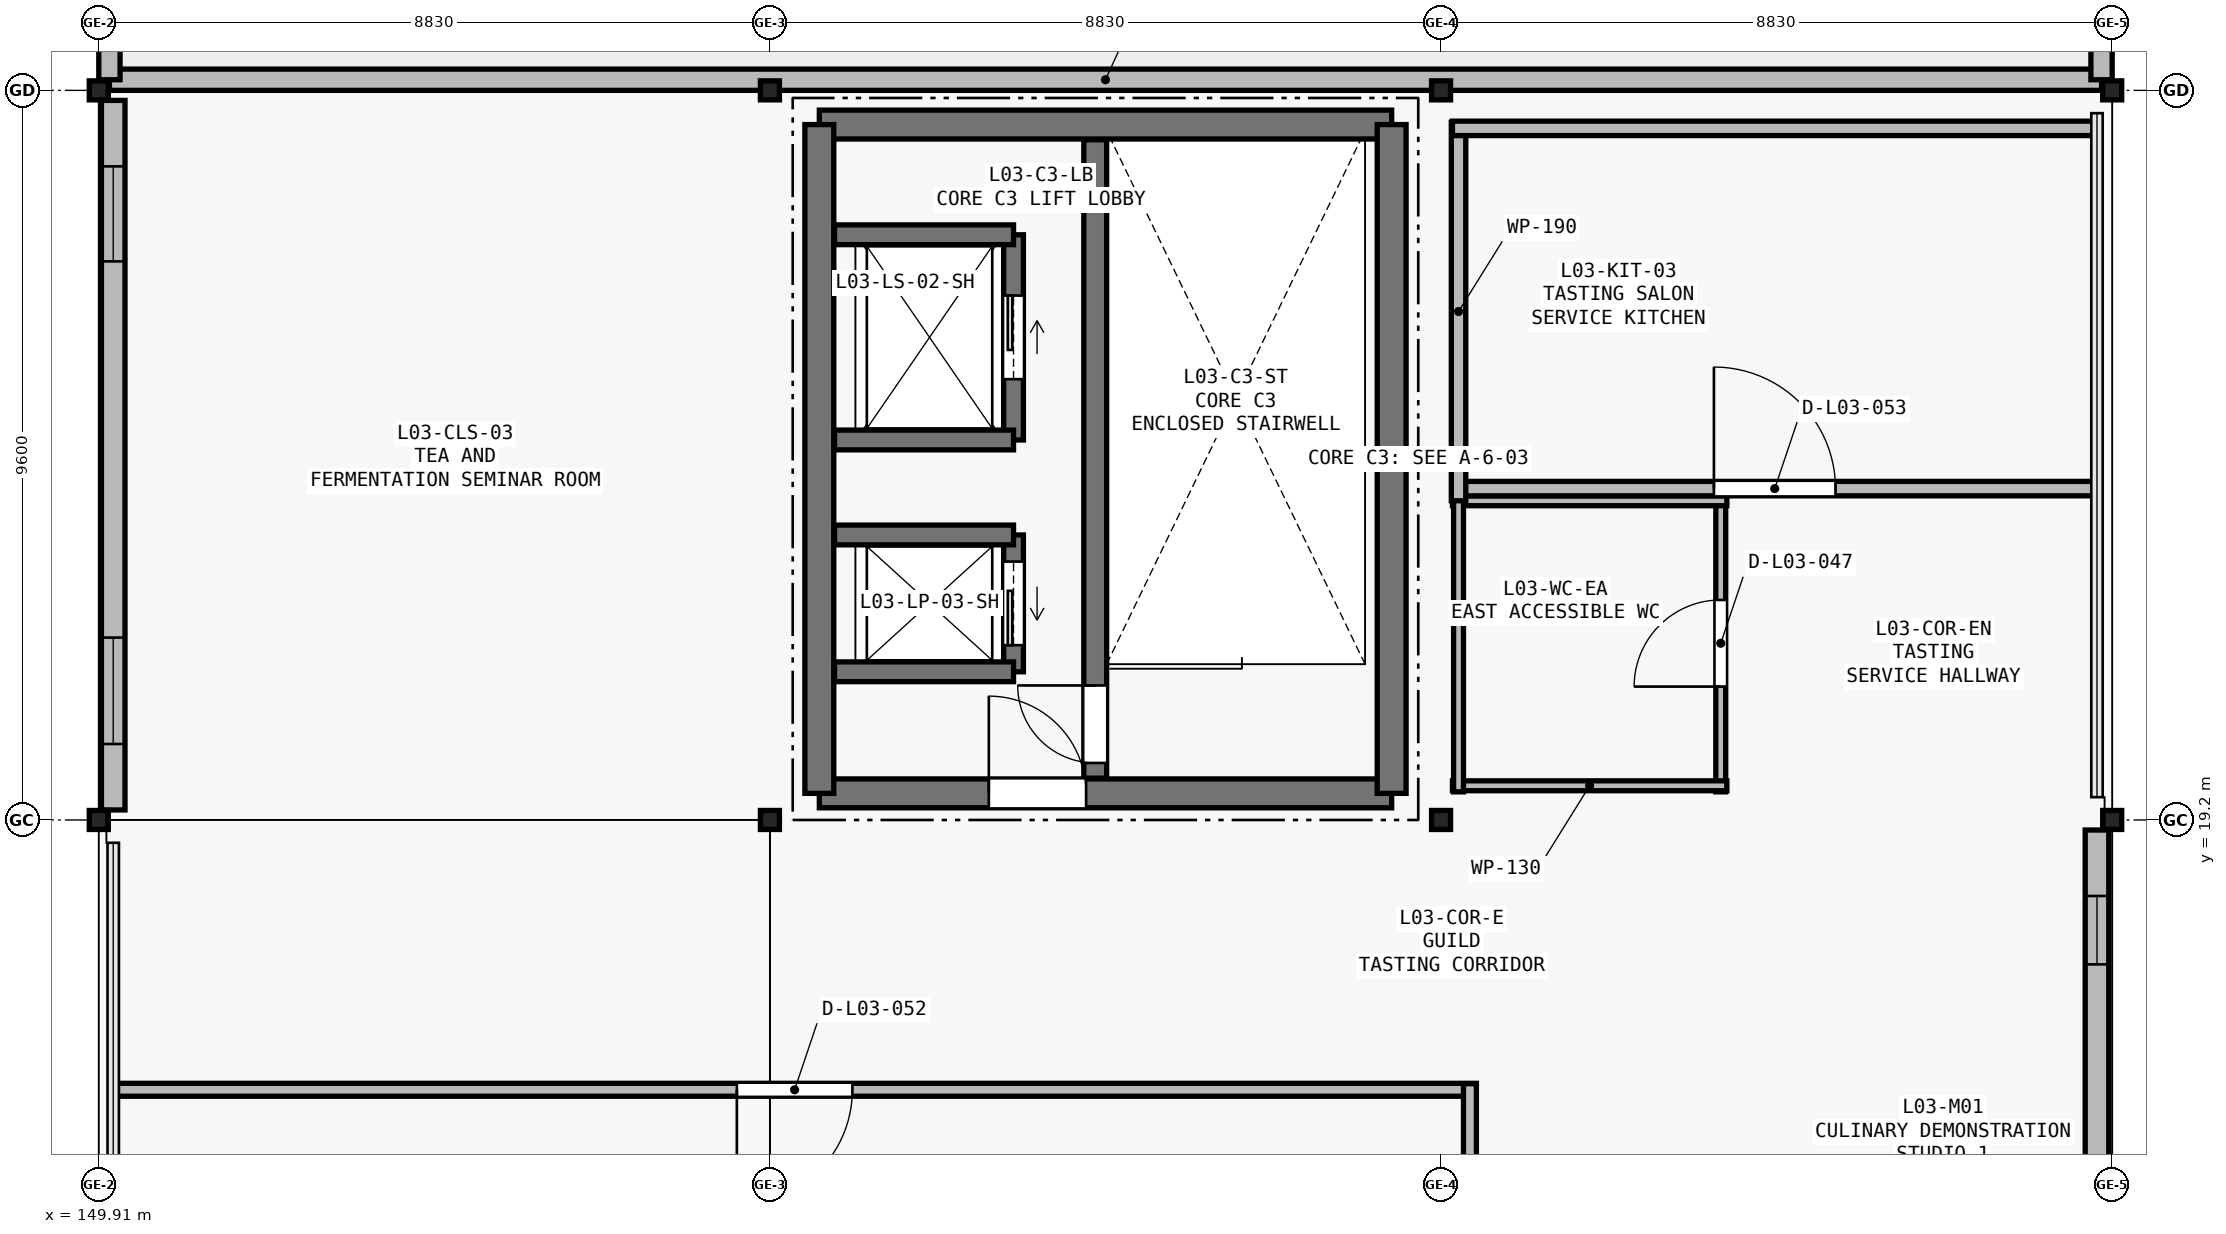
"""IFC4 building model, lengths in metres.
Left out: names, types, materials, properties, quantities, classifications, styles, units other than length and angle.
Written with IfcOpenShell. Run it as: python <this file> out.ifc"""

import sys

from ifc_helpers import new_model, si_unit, direction, frame, frame_2d, origin, origin_2d, place, context, subcontext, project, spatial, rectangle, i_section, extrude, element, fill, save


model = new_model("IFC4")
c1 = context("Model", 3, precision=1e-05, world=origin(), true_north=direction((0.0, 1.0)))
c2 = subcontext(c1, "Body", "Model", "MODEL_VIEW")
j1 = project(units=[si_unit("LENGTHUNIT", "METRE"), si_unit("PLANEANGLEUNIT", "RADIAN")], contexts=[c1])
p1 = place(None, origin())
s1 = spatial("IfcSite", under=j1, at=p1, CompositionType="ELEMENT")
p2 = place(p1, origin())
s2 = spatial("IfcBuilding", under=s1, at=p2, CompositionType="ELEMENT")
p3 = place(p2, frame((0.0, 0.0, 15.0)))
s3 = spatial("IfcBuildingStorey", under=s2, at=p3, CompositionType="ELEMENT", Elevation=15.0)
for number, where, z_axis, x_axis in (
    (1, (149.91, 19.2, 0.0), (0.0, 0.0, 1.0), (1.0, 0.0, 0.0)),
    (2, (149.91, 28.8, 0.0), (0.0, 0.0, 1.0), (1.0, 0.0, 0.0)),
    (3, (158.74, 19.2, 0.0), (0.0, 0.0, 1.0), (1.0, 0.0, 0.0)),
    (4, (158.74, 28.8, 0.0), (0.0, 0.0, 1.0), (1.0, 0.0, 0.0)),
    (5, (167.57, 19.2, 0.0), (0.0, 0.0, 1.0), (1.0, 0.0, 0.0)),
    (6, (167.57, 28.8, 0.0), (0.0, 0.0, 1.0), (1.0, 0.0, 0.0)),
    (7, (176.4, 19.2, 0.0), (0.0, 0.0, 1.0), (1.0, 0.0, 0.0)),
    (8, (176.4, 28.8, 0.0), (0.0, 0.0, 1.0), (1.0, 0.0, 0.0)),
):
    element("IfcColumn", number, at=place(p3, frame(where, z_axis=z_axis, x_axis=x_axis)), inside=s3, PredefinedType="COLUMN", context=c2, shape_type="SweptSolid", body=[
        extrude(i_section(OverallWidth=0.25, OverallDepth=0.25, WebThickness=0.009, FlangeThickness=0.014, FilletRadius=0.016, at=origin_2d()), origin(), (0.0, 0.0, 1.0), 4.2),
    ])
p4 = place(p3, frame((176.2, 19.068, 0.0), z_axis=(0.0, 0.0, 1.0), x_axis=(0.0, -1.0, 0.0)))
e9 = element("IfcWall", 9, at=p4, inside=s3, PredefinedType="SOLIDWALL", context=c2, shape_type="SweptSolid", body=[
    extrude(rectangle(XDim=9.336, YDim=0.31, at=frame_2d((4.668, 0.0))), origin(), (0.0, 0.0, 1.0), 3.35),
])
p5 = place(p4, frame((0.868, 0.0, 0.95)))
e10 = element("IfcOpeningElement", 10, at=p5, cuts=e9, PredefinedType="OPENING", context=c2, shape_type="SweptSolid", body=[
    extrude(rectangle(XDim=0.9, YDim=2.1, at=frame_2d((0.45, 1.05))), frame((0.0, 0.165, 0.0), z_axis=(0.0, -1.0, 0.0), x_axis=(1.0, 0.0, 0.0)), (0.0, 0.0, 1.0), 0.33),
])
p6 = place(p4, frame((7.368, 0.0, 0.95)))
e11 = element("IfcOpeningElement", 11, at=p6, cuts=e9, PredefinedType="OPENING", context=c2, shape_type="SweptSolid", body=[
    extrude(rectangle(XDim=1.1, YDim=2.1, at=frame_2d((0.55, 1.05))), frame((0.0, 0.165, 0.0), z_axis=(0.0, -1.0, 0.0), x_axis=(1.0, 0.0, 0.0)), (0.0, 0.0, 1.0), 0.33),
])
p7 = place(p3, frame((150.1, 28.668, 0.0), z_axis=(0.0, 0.0, 1.0), x_axis=(0.0, -1.0, 0.0)))
e12 = element("IfcWall", 12, at=p7, inside=s3, PredefinedType="SOLIDWALL", context=c2, shape_type="SweptSolid", body=[
    extrude(rectangle(XDim=9.336, YDim=0.31, at=frame_2d((4.668, 0.0))), origin(), (0.0, 0.0, 1.0), 3.35),
])
p8 = place(p7, frame((0.868, 0.0, 0.95)))
e13 = element("IfcOpeningElement", 13, at=p8, cuts=e12, PredefinedType="OPENING", context=c2, shape_type="SweptSolid", body=[
    extrude(rectangle(XDim=1.25, YDim=2.1, at=frame_2d((0.625, 1.05))), frame((0.0, 0.165, 0.0), z_axis=(0.0, -1.0, 0.0), x_axis=(1.0, 0.0, 0.0)), (0.0, 0.0, 1.0), 0.33),
])
p9 = place(p7, frame((7.068, 0.0, 0.95)))
e14 = element("IfcOpeningElement", 14, at=p9, cuts=e12, PredefinedType="OPENING", context=c2, shape_type="SweptSolid", body=[
    extrude(rectangle(XDim=1.4, YDim=2.1, at=frame_2d((0.7, 1.05))), frame((0.0, 0.165, 0.0), z_axis=(0.0, -1.0, 0.0), x_axis=(1.0, 0.0, 0.0)), (0.0, 0.0, 1.0), 0.33),
])
p10 = place(p3, frame((150.05, 28.94, 0.01), z_axis=(0.0, 0.0, 1.0), x_axis=(1.0, 0.0, 0.0)))
e15 = element("IfcWall", 15, at=p10, inside=s3, PredefinedType="PARAPET", context=c2, shape_type="SweptSolid", body=[
    extrude(rectangle(XDim=26.21, YDim=0.28, at=frame_2d((13.105, 0.0))), origin(), (0.0, 0.0, 1.0), 1.15),
])
for number, where, z_axis, x_axis in (
    (16, (176.26, 28.94, 0.01), (0.0, 0.0, 1.0), (0.0, 1.0, 0.0)),
    (17, (150.05, 35.86, 0.01), (0.0, 0.0, 1.0), (0.0, -1.0, 0.0)),
):
    element("IfcWall", number, at=place(p3, frame(where, z_axis=z_axis, x_axis=x_axis)), inside=s3, PredefinedType="PARAPET", context=c2, shape_type="SweptSolid", body=[
        extrude(rectangle(XDim=6.92, YDim=0.28, at=frame_2d((3.46, 0.0))), origin(), (0.0, 0.0, 1.0), 1.15),
    ])
p11 = place(p3, frame((159.39, 19.55, 0.0), z_axis=(0.0, 0.0, 1.0), x_axis=(1.0, 0.0, 0.0)))
e18 = element("IfcWall", 18, at=p11, inside=s3, PredefinedType="SHEAR", context=c2, shape_type="SweptSolid", body=[
    extrude(rectangle(XDim=7.53, YDim=0.38, at=frame_2d((3.765, 0.0))), origin(), (0.0, 0.0, 1.0), 4.2),
])
p12 = place(p11, frame((2.23, 0.0, 0.0)))
e19 = element("IfcOpeningElement", 19, at=p12, cuts=e18, PredefinedType="OPENING", context=c2, shape_type="SweptSolid", body=[
    extrude(rectangle(XDim=1.28, YDim=2.15, at=frame_2d((0.64, 1.075))), frame((0.0, 0.2, 0.0), z_axis=(0.0, -1.0, 0.0), x_axis=(1.0, 0.0, 0.0)), (0.0, 0.0, 1.0), 0.4),
])
p13 = place(p3, frame((166.92, 28.35, 0.0), z_axis=(0.0, 0.0, 1.0), x_axis=(-1.0, 0.0, 0.0)))
e20 = element("IfcWall", 20, at=p13, inside=s3, PredefinedType="SHEAR", context=c2, shape_type="SweptSolid", body=[
    extrude(rectangle(XDim=7.53, YDim=0.38, at=frame_2d((3.765, 0.0))), origin(), (0.0, 0.0, 1.0), 4.2),
])
for number, where, z_axis, x_axis in (
    (21, (159.39, 28.35, 0.0), (0.0, 0.0, 1.0), (0.0, -1.0, 0.0)),
    (22, (166.92, 19.55, 0.0), (0.0, 0.0, 1.0), (0.0, 1.0, 0.0)),
):
    element("IfcWall", number, at=place(p3, frame(where, z_axis=z_axis, x_axis=x_axis)), inside=s3, PredefinedType="SHEAR", context=c2, shape_type="SweptSolid", body=[
        extrude(rectangle(XDim=8.8, YDim=0.38, at=frame_2d((4.4, 0.0))), origin(), (0.0, 0.0, 1.0), 4.2),
    ])
p14 = place(p3, frame((163.02, 19.75, 0.0), z_axis=(0.0, 0.0, 1.0), x_axis=(0.0, 1.0, 0.0)))
e23 = element("IfcWall", 23, at=p14, inside=s3, PredefinedType="SHEAR", context=c2, shape_type="SweptSolid", body=[
    extrude(rectangle(XDim=8.4, YDim=0.3, at=frame_2d((4.2, 0.0))), origin(), (0.0, 0.0, 1.0), 4.2),
])
p15 = place(p14, frame((0.2, 0.0, 0.0)))
e24 = element("IfcOpeningElement", 24, at=p15, cuts=e23, PredefinedType="OPENING", context=c2, shape_type="SweptSolid", body=[
    extrude(rectangle(XDim=1.02, YDim=2.1, at=frame_2d((0.51, 1.05))), frame((0.0, 0.16, 0.0), z_axis=(0.0, -1.0, 0.0), x_axis=(1.0, 0.0, 0.0)), (0.0, 0.0, 1.0), 0.32),
])
p16 = place(p3, frame((161.945, 21.15, 0.0), z_axis=(0.0, 0.0, 1.0), x_axis=(0.0, 1.0, 0.0)))
e25 = element("IfcWall", 25, at=p16, inside=s3, PredefinedType="SHEAR", context=c2, shape_type="SweptSolid", body=[
    extrude(rectangle(XDim=1.8, YDim=0.26, at=frame_2d((0.9, 0.0))), origin(), (0.0, 0.0, 1.0), 4.2),
])
p17 = place(p16, frame((0.35, 0.0, 0.0)))
e26 = element("IfcOpeningElement", 26, at=p17, cuts=e25, PredefinedType="OPENING", context=c2, shape_type="SweptSolid", body=[
    extrude(rectangle(XDim=1.1, YDim=2.15, at=frame_2d((0.55, 1.075))), frame((0.0, 0.14, 0.0), z_axis=(0.0, -1.0, 0.0), x_axis=(1.0, 0.0, 0.0)), (0.0, 0.0, 1.0), 0.28),
])
for number, where, z_axis, x_axis in (
    (27, (159.59, 21.15, 0.0), (0.0, 0.0, 1.0), (1.0, 0.0, 0.0)),
    (28, (159.59, 22.95, 0.0), (0.0, 0.0, 1.0), (1.0, 0.0, 0.0)),
):
    element("IfcWall", number, at=place(p3, frame(where, z_axis=z_axis, x_axis=x_axis)), inside=s3, PredefinedType="SHEAR", context=c2, shape_type="SweptSolid", body=[
        extrude(rectangle(XDim=2.355, YDim=0.26, at=frame_2d((1.177, 0.0))), origin(), (0.0, 0.0, 1.0), 4.2),
    ])
p18 = place(p3, frame((161.945, 24.2, 0.0), z_axis=(0.0, 0.0, 1.0), x_axis=(0.0, 1.0, 0.0)))
e29 = element("IfcWall", 29, at=p18, inside=s3, PredefinedType="SHEAR", context=c2, shape_type="SweptSolid", body=[
    extrude(rectangle(XDim=2.7, YDim=0.26, at=frame_2d((1.35, 0.0))), origin(), (0.0, 0.0, 1.0), 4.2),
])
p19 = place(p18, frame((0.8, 0.0, 0.0)))
e30 = element("IfcOpeningElement", 30, at=p19, cuts=e29, PredefinedType="OPENING", context=c2, shape_type="SweptSolid", body=[
    extrude(rectangle(XDim=1.1, YDim=2.15, at=frame_2d((0.55, 1.075))), frame((0.0, 0.14, 0.0), z_axis=(0.0, -1.0, 0.0), x_axis=(1.0, 0.0, 0.0)), (0.0, 0.0, 1.0), 0.28),
])
for number, where, z_axis, x_axis in (
    (31, (159.59, 24.2, 0.0), (0.0, 0.0, 1.0), (1.0, 0.0, 0.0)),
    (32, (159.59, 26.9, 0.0), (0.0, 0.0, 1.0), (1.0, 0.0, 0.0)),
):
    element("IfcWall", number, at=place(p3, frame(where, z_axis=z_axis, x_axis=x_axis)), inside=s3, PredefinedType="SHEAR", context=c2, shape_type="SweptSolid", body=[
        extrude(rectangle(XDim=2.355, YDim=0.26, at=frame_2d((1.177, 0.0))), origin(), (0.0, 0.0, 1.0), 4.2),
    ])
p20 = place(p3, frame((171.25, 19.57, 0.0), z_axis=(0.0, 0.0, 1.0), x_axis=(0.0, 1.0, 0.0)))
e33 = element("IfcWall", 33, at=p20, inside=s3, PredefinedType="PARTITIONING", context=c2, shape_type="SweptSolid", body=[
    extrude(rectangle(XDim=3.91, YDim=0.13, at=frame_2d((1.955, 0.0))), origin(), (0.0, 0.0, 1.0), 3.72),
])
p21 = place(p20, frame((1.385, 0.0, 0.0)))
e34 = element("IfcOpeningElement", 34, at=p21, cuts=e33, PredefinedType="OPENING", context=c2, shape_type="SweptSolid", body=[
    extrude(rectangle(XDim=1.14, YDim=2.22, at=frame_2d((0.57, 1.11))), frame((0.0, 0.075, 0.0), z_axis=(0.0, -1.0, 0.0), x_axis=(1.0, 0.0, 0.0)), (0.0, 0.0, 1.0), 0.15),
])
for number, where, z_axis, x_axis in (
    (35, (167.72, 19.65, 0.0), (0.0, 0.0, 1.0), (1.0, 0.0, 0.0)),
    (36, (171.33, 23.4, 0.0), (0.0, 0.0, 1.0), (-1.0, 0.0, 0.0)),
):
    element("IfcWall", number, at=place(p3, frame(where, z_axis=z_axis, x_axis=x_axis)), inside=s3, PredefinedType="PARTITIONING", context=c2, shape_type="SweptSolid", body=[
        extrude(rectangle(XDim=3.61, YDim=0.13, at=frame_2d((1.805, 0.0))), origin(), (0.0, 0.0, 1.0), 3.72),
    ])
p22 = place(p3, frame((167.8, 23.48, 0.0), z_axis=(0.0, 0.0, 1.0), x_axis=(0.0, -1.0, 0.0)))
e37 = element("IfcWall", 37, at=p22, inside=s3, PredefinedType="PARTITIONING", context=c2, shape_type="SweptSolid", body=[
    extrude(rectangle(XDim=3.91, YDim=0.13, at=frame_2d((1.955, 0.0))), origin(), (0.0, 0.0, 1.0), 3.72),
])
p23 = place(p3, frame((168.03, 15.65, 0.0), z_axis=(0.0, 0.0, 1.0), x_axis=(-1.0, 0.0, 0.0)))
e38 = element("IfcWall", 38, at=p23, inside=s3, PredefinedType="PARTITIONING", context=c2, shape_type="SweptSolid", body=[
    extrude(rectangle(XDim=17.93, YDim=0.17, at=frame_2d((8.965, 0.0))), origin(), (0.0, 0.0, 1.0), 3.72),
])
p24 = place(p23, frame((8.205, 0.0, 0.0)))
e39 = element("IfcOpeningElement", 39, at=p24, cuts=e38, PredefinedType="OPENING", context=c2, shape_type="SweptSolid", body=[
    extrude(rectangle(XDim=1.52, YDim=2.28, at=frame_2d((0.76, 1.14))), frame((0.0, 0.095, 0.0), z_axis=(0.0, -1.0, 0.0), x_axis=(1.0, 0.0, 0.0)), (0.0, 0.0, 1.0), 0.19),
])
p25 = place(p3, frame((167.95, 0.2, 0.0), z_axis=(0.0, 0.0, 1.0), x_axis=(0.0, 1.0, 0.0)))
e40 = element("IfcWall", 40, at=p25, inside=s3, PredefinedType="PARTITIONING", context=c2, shape_type="SweptSolid", body=[
    extrude(rectangle(XDim=15.53, YDim=0.17, at=frame_2d((7.765, 0.0))), origin(), (0.0, 0.0, 1.0), 3.72),
])
p26 = place(p3, frame((167.72, 23.56, 0.0), z_axis=(0.0, 0.0, 1.0), x_axis=(1.0, 0.0, 0.0)))
e41 = element("IfcWall", 41, at=p26, inside=s3, PredefinedType="PARTITIONING", context=c2, shape_type="SweptSolid", body=[
    extrude(rectangle(XDim=8.48, YDim=0.19, at=frame_2d((4.24, 0.0))), origin(), (0.0, 0.0, 1.0), 3.72),
])
p27 = place(p26, frame((3.44, 0.0, 0.0)))
e42 = element("IfcOpeningElement", 42, at=p27, cuts=e41, PredefinedType="OPENING", context=c2, shape_type="SweptSolid", body=[
    extrude(rectangle(XDim=1.6, YDim=2.2, at=frame_2d((0.8, 1.1))), frame((0.0, 0.105, 0.0), z_axis=(0.0, -1.0, 0.0), x_axis=(1.0, 0.0, 0.0)), (0.0, 0.0, 1.0), 0.21),
])
p28 = place(p3, frame((167.8, 28.38, 0.0), z_axis=(0.0, 0.0, 1.0), x_axis=(0.0, -1.0, 0.0)))
e43 = element("IfcWall", 43, at=p28, inside=s3, PredefinedType="PARTITIONING", context=c2, shape_type="SweptSolid", body=[
    extrude(rectangle(XDim=4.98, YDim=0.19, at=frame_2d((2.49, 0.0))), origin(), (0.0, 0.0, 1.0), 3.4),
])
p29 = place(p3, frame((176.2, 28.3, 0.0), z_axis=(0.0, 0.0, 1.0), x_axis=(-1.0, 0.0, 0.0)))
e44 = element("IfcWall", 44, at=p29, inside=s3, PredefinedType="PARTITIONING", context=c2, shape_type="SweptSolid", body=[
    extrude(rectangle(XDim=8.48, YDim=0.19, at=frame_2d((4.24, 0.0))), origin(), (0.0, 0.0, 1.0), 3.72),
])
p30 = place(p5, origin())
e45 = element("IfcWindow", 45, at=p30, inside=s3, PartitioningType="SINGLE_PANEL", PredefinedType="WINDOW", context=c2, shape_type="SweptSolid", body=[
    extrude(rectangle(XDim=0.9, YDim=2.1, at=frame_2d((0.45, 1.05))), frame((0.0, 0.03, 0.0), z_axis=(0.0, -1.0, 0.0), x_axis=(1.0, 0.0, 0.0)), (0.0, 0.0, 1.0), 0.06),
])
fill(e10, e45)
p31 = place(p8, origin())
e46 = element("IfcWindow", 46, at=p31, inside=s3, PartitioningType="SINGLE_PANEL", PredefinedType="WINDOW", context=c2, shape_type="SweptSolid", body=[
    extrude(rectangle(XDim=1.25, YDim=2.1, at=frame_2d((0.625, 1.05))), frame((0.0, 0.03, 0.0), z_axis=(0.0, -1.0, 0.0), x_axis=(1.0, 0.0, 0.0)), (0.0, 0.0, 1.0), 0.06),
])
fill(e13, e46)
p32 = place(p9, origin())
e47 = element("IfcWindow", 47, at=p32, inside=s3, PartitioningType="SINGLE_PANEL", PredefinedType="WINDOW", context=c2, shape_type="SweptSolid", body=[
    extrude(rectangle(XDim=1.4, YDim=2.1, at=frame_2d((0.7, 1.05))), frame((0.0, 0.03, 0.0), z_axis=(0.0, -1.0, 0.0), x_axis=(1.0, 0.0, 0.0)), (0.0, 0.0, 1.0), 0.06),
])
fill(e14, e47)
p33 = place(p12, origin())
e48 = element("IfcDoor", 48, at=p33, inside=s3, OperationType="SINGLE_SWING_LEFT", PredefinedType="DOOR", context=c2, shape_type="SweptSolid", body=[
    extrude(rectangle(XDim=1.28, YDim=2.15, at=frame_2d((0.64, 1.075))), frame((0.0, 0.025, 0.0), z_axis=(0.0, -1.0, 0.0), x_axis=(1.0, 0.0, 0.0)), (0.0, 0.0, 1.0), 0.05),
])
fill(e19, e48)
p34 = place(p15, origin())
e49 = element("IfcDoor", 49, at=p34, inside=s3, OperationType="SINGLE_SWING_RIGHT", PredefinedType="DOOR", context=c2, shape_type="SweptSolid", body=[
    extrude(rectangle(XDim=1.02, YDim=2.1, at=frame_2d((0.51, 1.05))), frame((0.0, 0.025, 0.0), z_axis=(0.0, -1.0, 0.0), x_axis=(1.0, 0.0, 0.0)), (0.0, 0.0, 1.0), 0.05),
])
fill(e24, e49)
p35 = place(p17, origin())
e50 = element("IfcDoor", 50, at=p35, inside=s3, OperationType="SLIDING_TO_LEFT", PredefinedType="DOOR", context=c2, shape_type="SweptSolid", body=[
    extrude(rectangle(XDim=1.1, YDim=2.15, at=frame_2d((0.55, 1.075))), frame((0.0, 0.025, 0.0), z_axis=(0.0, -1.0, 0.0), x_axis=(1.0, 0.0, 0.0)), (0.0, 0.0, 1.0), 0.05),
])
fill(e26, e50)
p36 = place(p19, origin())
e51 = element("IfcDoor", 51, at=p36, inside=s3, OperationType="SLIDING_TO_RIGHT", PredefinedType="DOOR", context=c2, shape_type="SweptSolid", body=[
    extrude(rectangle(XDim=1.1, YDim=2.15, at=frame_2d((0.55, 1.075))), frame((0.0, 0.025, 0.0), z_axis=(0.0, -1.0, 0.0), x_axis=(1.0, 0.0, 0.0)), (0.0, 0.0, 1.0), 0.05),
])
fill(e30, e51)
p37 = place(p21, origin())
e52 = element("IfcDoor", 52, at=p37, inside=s3, OperationType="SINGLE_SWING_LEFT", PredefinedType="DOOR", context=c2, shape_type="SweptSolid", body=[
    extrude(rectangle(XDim=1.14, YDim=2.22, at=frame_2d((0.57, 1.11))), frame((0.0, 0.025, 0.0), z_axis=(0.0, -1.0, 0.0), x_axis=(1.0, 0.0, 0.0)), (0.0, 0.0, 1.0), 0.05),
])
fill(e34, e52)
p38 = place(p24, origin())
e53 = element("IfcDoor", 53, at=p38, inside=s3, OperationType="SINGLE_SWING_RIGHT", PredefinedType="DOOR", context=c2, shape_type="SweptSolid", body=[
    extrude(rectangle(XDim=1.52, YDim=2.28, at=frame_2d((0.76, 1.14))), frame((0.0, 0.025, 0.0), z_axis=(0.0, -1.0, 0.0), x_axis=(1.0, 0.0, 0.0)), (0.0, 0.0, 1.0), 0.05),
])
fill(e39, e53)
p39 = place(p27, origin())
e54 = element("IfcDoor", 54, at=p39, inside=s3, OperationType="SINGLE_SWING_LEFT", PredefinedType="DOOR", context=c2, shape_type="SweptSolid", body=[
    extrude(rectangle(XDim=1.6, YDim=2.2, at=frame_2d((0.8, 1.1))), frame((0.0, 0.025, 0.0), z_axis=(0.0, -1.0, 0.0), x_axis=(1.0, 0.0, 0.0)), (0.0, 0.0, 1.0), 0.05),
])
fill(e42, e54)
save(model, sys.argv[1])
